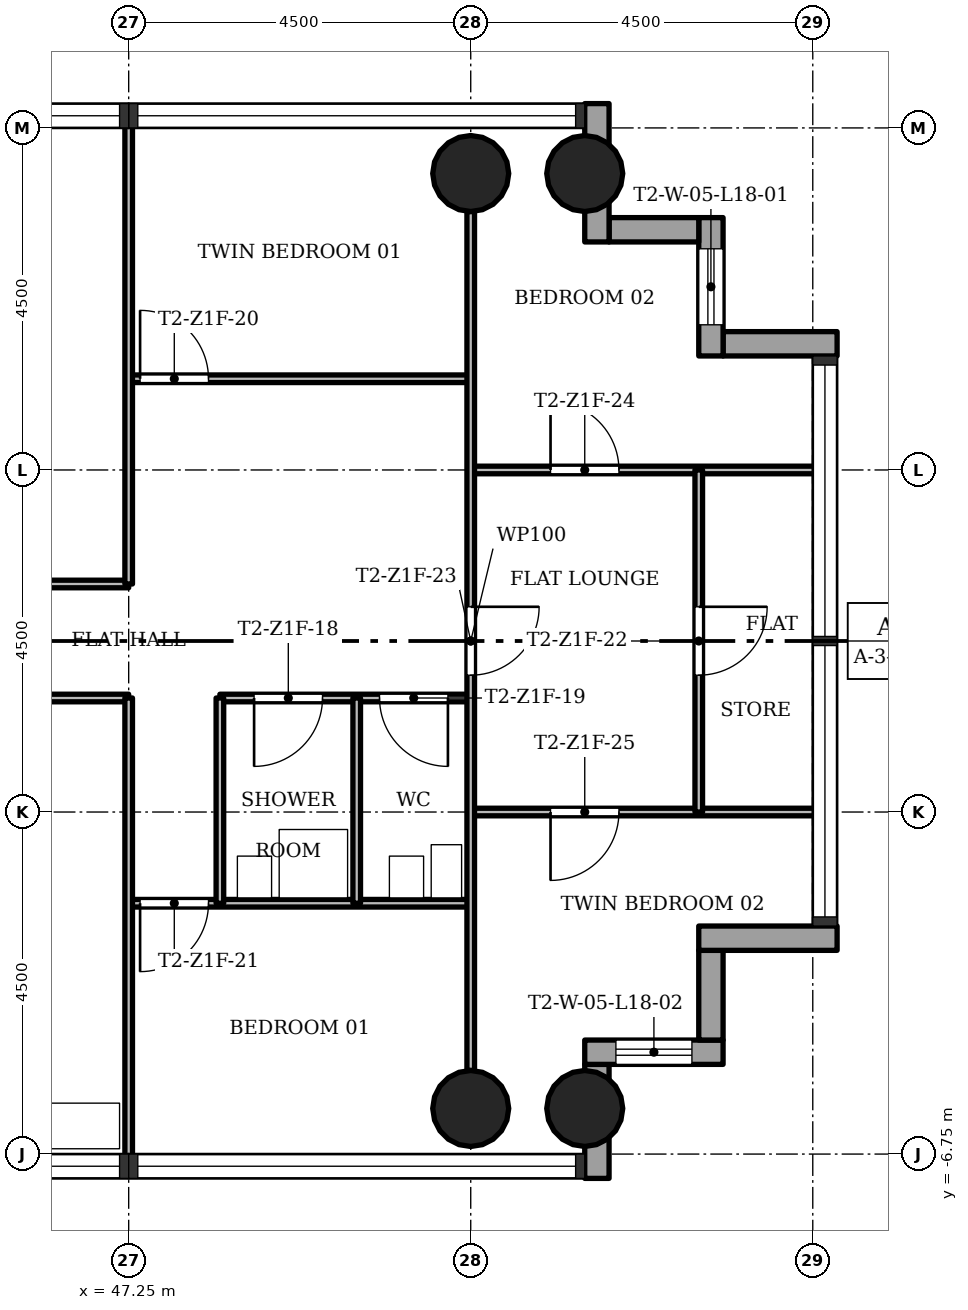
"""IFC4 building model, lengths in metres.
Left out: names, types, materials, properties, quantities, classifications, styles, units other than length and angle.
Written with IfcOpenShell. Run it as: python <this file> out.ifc"""

import sys

from ifc_helpers import new_model, si_unit, direction, frame, frame_2d, origin, origin_2d, place, context, subcontext, project, spatial, rectangle, hollow_circle, extrude, element, fill, save


model = new_model("IFC4")
c1 = context("Model", 3, precision=1e-05, world=origin(), true_north=direction((0.0, 1.0)))
c2 = subcontext(c1, "Body", "Model", "MODEL_VIEW")
j1 = project(units=[si_unit("LENGTHUNIT", "METRE"), si_unit("PLANEANGLEUNIT", "RADIAN")], contexts=[c1])
p1 = place(None, origin())
s1 = spatial("IfcSite", under=j1, at=p1, CompositionType="ELEMENT")
p2 = place(p1, origin())
s2 = spatial("IfcBuilding", under=s1, at=p2, CompositionType="ELEMENT")
p3 = place(p2, frame((0.0, 0.0, 68.7)))
s3 = spatial("IfcBuildingStorey", under=s2, at=p3, CompositionType="ELEMENT", Elevation=68.7)
for number, where, z_axis, x_axis in (
    (1, (51.75, -6.15, 0.0), (0.0, 0.0, 1.0), (1.0, 0.0, 0.0)),
    (2, (51.75, 6.15, 0.0), (0.0, 0.0, 1.0), (1.0, 0.0, 0.0)),
    (3, (53.25, -6.15, 0.0), (0.0, 0.0, 1.0), (1.0, 0.0, 0.0)),
    (4, (53.25, 6.15, 0.0), (0.0, 0.0, 1.0), (1.0, 0.0, 0.0)),
):
    element("IfcColumn", number, at=place(p3, frame(where, z_axis=z_axis, x_axis=x_axis)), inside=s3, PredefinedType="COLUMN", context=c2, shape_type="SweptSolid", body=[
        extrude(hollow_circle(Radius=0.5, WallThickness=0.036, at=origin_2d()), origin(), (0.0, 0.0, 1.0), 3.4),
    ])
p4 = place(p3, frame((53.41, -7.07, -0.3), z_axis=(0.0, 0.0, 1.0), x_axis=(0.0, 1.0, 0.0)))
e5 = element("IfcWall", 5, at=p4, inside=s3, PredefinedType="STANDARD", context=c2, shape_type="SweptSolid", body=[
    extrude(rectangle(XDim=1.5, YDim=0.32, at=frame_2d((0.75, 0.0))), origin(), (0.0, 0.0, 1.0), 3.4),
])
p5 = place(p3, frame((53.25, -5.41, -0.3), z_axis=(0.0, 0.0, 1.0), x_axis=(1.0, 0.0, 0.0)))
e6 = element("IfcWall", 6, at=p5, inside=s3, PredefinedType="STANDARD", context=c2, shape_type="SweptSolid", body=[
    extrude(rectangle(XDim=1.82, YDim=0.32, at=frame_2d((0.91, 0.0))), origin(), (0.0, 0.0, 1.0), 3.4),
])
p6 = place(p5, frame((0.41, 0.0, 1.2)))
e7 = element("IfcOpeningElement", 7, at=p6, cuts=e6, PredefinedType="OPENING", context=c2, shape_type="SweptSolid", body=[
    extrude(rectangle(XDim=1.0, YDim=1.5, at=frame_2d((0.5, 0.75))), frame((0.0, 0.17, 0.0), z_axis=(0.0, -1.0, 0.0), x_axis=(1.0, 0.0, 0.0)), (0.0, 0.0, 1.0), 0.34),
])
p7 = place(p3, frame((54.91, -5.25, -0.3), z_axis=(0.0, 0.0, 1.0), x_axis=(0.0, 1.0, 0.0)))
e8 = element("IfcWall", 8, at=p7, inside=s3, PredefinedType="STANDARD", context=c2, shape_type="SweptSolid", body=[
    extrude(rectangle(XDim=1.18, YDim=0.32, at=frame_2d((0.59, 0.0))), origin(), (0.0, 0.0, 1.0), 3.4),
])
p8 = place(p3, frame((54.75, -3.91, -0.3), z_axis=(0.0, 0.0, 1.0), x_axis=(1.0, 0.0, 0.0)))
e9 = element("IfcWall", 9, at=p8, inside=s3, PredefinedType="STANDARD", context=c2, shape_type="SweptSolid", body=[
    extrude(rectangle(XDim=1.82, YDim=0.32, at=frame_2d((0.91, 0.0))), origin(), (0.0, 0.0, 1.0), 3.4),
])
p9 = place(p3, frame((56.57, 3.91, -0.3), z_axis=(0.0, 0.0, 1.0), x_axis=(-1.0, 0.0, 0.0)))
e10 = element("IfcWall", 10, at=p9, inside=s3, PredefinedType="STANDARD", context=c2, shape_type="SweptSolid", body=[
    extrude(rectangle(XDim=1.5, YDim=0.32, at=frame_2d((0.75, 0.0))), origin(), (0.0, 0.0, 1.0), 3.4),
])
p10 = place(p3, frame((54.91, 3.75, -0.3), z_axis=(0.0, 0.0, 1.0), x_axis=(0.0, 1.0, 0.0)))
e11 = element("IfcWall", 11, at=p10, inside=s3, PredefinedType="STANDARD", context=c2, shape_type="SweptSolid", body=[
    extrude(rectangle(XDim=1.82, YDim=0.32, at=frame_2d((0.91, 0.0))), origin(), (0.0, 0.0, 1.0), 3.4),
])
p11 = place(p10, frame((0.41, 0.0, 1.2)))
e12 = element("IfcOpeningElement", 12, at=p11, cuts=e11, PredefinedType="OPENING", context=c2, shape_type="SweptSolid", body=[
    extrude(rectangle(XDim=1.0, YDim=1.5, at=frame_2d((0.5, 0.75))), frame((0.0, 0.17, 0.0), z_axis=(0.0, -1.0, 0.0), x_axis=(1.0, 0.0, 0.0)), (0.0, 0.0, 1.0), 0.34),
])
p12 = place(p3, frame((54.75, 5.41, -0.3), z_axis=(0.0, 0.0, 1.0), x_axis=(-1.0, 0.0, 0.0)))
e13 = element("IfcWall", 13, at=p12, inside=s3, PredefinedType="STANDARD", context=c2, shape_type="SweptSolid", body=[
    extrude(rectangle(XDim=1.18, YDim=0.32, at=frame_2d((0.59, 0.0))), origin(), (0.0, 0.0, 1.0), 3.4),
])
p13 = place(p3, frame((53.41, 5.25, -0.3), z_axis=(0.0, 0.0, 1.0), x_axis=(0.0, 1.0, 0.0)))
e14 = element("IfcWall", 14, at=p13, inside=s3, PredefinedType="STANDARD", context=c2, shape_type="SweptSolid", body=[
    extrude(rectangle(XDim=1.82, YDim=0.32, at=frame_2d((0.91, 0.0))), origin(), (0.0, 0.0, 1.0), 3.4),
])
p14 = place(p3, frame((51.75, -3.45, 0.0), z_axis=(0.0, 0.0, 1.0), x_axis=(-1.0, 0.0, 0.0)))
e15 = element("IfcWall", 15, at=p14, inside=s3, PredefinedType="PARTITIONING", context=c2, shape_type="SweptSolid", body=[
    extrude(rectangle(XDim=4.5, YDim=0.1, at=frame_2d((2.25, 0.0))), origin(), (0.0, 0.0, 1.0), 3.0),
])
p15 = place(p14, frame((3.45, 0.0, 0.0)))
e16 = element("IfcOpeningElement", 16, at=p15, cuts=e15, PredefinedType="OPENING", context=c2, shape_type="SweptSolid", body=[
    extrude(rectangle(XDim=0.9, YDim=2.1, at=frame_2d((0.45, 1.05))), frame((0.0, 0.06, 0.0), z_axis=(0.0, -1.0, 0.0), x_axis=(1.0, 0.0, 0.0)), (0.0, 0.0, 1.0), 0.12),
])
p16 = place(p3, frame((56.35, -2.25, 0.0), z_axis=(0.0, 0.0, 1.0), x_axis=(-1.0, 0.0, 0.0)))
e17 = element("IfcWall", 17, at=p16, inside=s3, PredefinedType="PARTITIONING", context=c2, shape_type="SweptSolid", body=[
    extrude(rectangle(XDim=4.6, YDim=0.1, at=frame_2d((2.3, 0.0))), origin(), (0.0, 0.0, 1.0), 3.0),
])
p17 = place(p16, frame((2.65, 0.0, 0.0)))
e18 = element("IfcOpeningElement", 18, at=p17, cuts=e17, PredefinedType="OPENING", context=c2, shape_type="SweptSolid", body=[
    extrude(rectangle(XDim=0.9, YDim=2.1, at=frame_2d((0.45, 1.05))), frame((0.0, 0.06, 0.0), z_axis=(0.0, -1.0, 0.0), x_axis=(1.0, 0.0, 0.0)), (0.0, 0.0, 1.0), 0.12),
])
p18 = place(p3, frame((51.75, -0.75, 0.0), z_axis=(0.0, 0.0, 1.0), x_axis=(-1.0, 0.0, 0.0)))
e19 = element("IfcWall", 19, at=p18, inside=s3, PredefinedType="PARTITIONING", context=c2, shape_type="SweptSolid", body=[
    extrude(rectangle(XDim=3.3, YDim=0.1, at=frame_2d((1.65, 0.0))), origin(), (0.0, 0.0, 1.0), 3.0),
])
p19 = place(p18, frame((1.95, 0.0, 0.0)))
e20 = element("IfcOpeningElement", 20, at=p19, cuts=e19, PredefinedType="OPENING", context=c2, shape_type="SweptSolid", body=[
    extrude(rectangle(XDim=0.9, YDim=2.1, at=frame_2d((0.45, 1.05))), frame((0.0, 0.06, 0.0), z_axis=(0.0, -1.0, 0.0), x_axis=(1.0, 0.0, 0.0)), (0.0, 0.0, 1.0), 0.12),
])
p20 = place(p18, frame((0.3, 0.0, 0.0)))
e21 = element("IfcOpeningElement", 21, at=p20, cuts=e19, PredefinedType="OPENING", context=c2, shape_type="SweptSolid", body=[
    extrude(rectangle(XDim=0.9, YDim=2.1, at=frame_2d((0.45, 1.05))), frame((0.0, 0.06, 0.0), z_axis=(0.0, -1.0, 0.0), x_axis=(1.0, 0.0, 0.0)), (0.0, 0.0, 1.0), 0.12),
])
p21 = place(p3, frame((47.25, -0.75, 0.0), z_axis=(0.0, 0.0, 1.0), x_axis=(-1.0, 0.0, 0.0)))
e22 = element("IfcWall", 22, at=p21, inside=s3, PredefinedType="PARTITIONING", context=c2, shape_type="SweptSolid", body=[
    extrude(rectangle(XDim=4.5, YDim=0.1, at=frame_2d((2.25, 0.0))), origin(), (0.0, 0.0, 1.0), 3.0),
])
p22 = place(p21, frame((1.8, 0.0, 0.0)))
e23 = element("IfcOpeningElement", 23, at=p22, cuts=e22, PredefinedType="OPENING", context=c2, shape_type="SweptSolid", body=[
    extrude(rectangle(XDim=0.9, YDim=2.1, at=frame_2d((0.45, 1.05))), frame((0.0, 0.06, 0.0), z_axis=(0.0, -1.0, 0.0), x_axis=(1.0, 0.0, 0.0)), (0.0, 0.0, 1.0), 0.12),
])
p23 = place(p3, frame((47.25, 0.75, 0.0), z_axis=(0.0, 0.0, 1.0), x_axis=(-1.0, 0.0, 0.0)))
e24 = element("IfcWall", 24, at=p23, inside=s3, PredefinedType="PARTITIONING", context=c2, shape_type="SweptSolid", body=[
    extrude(rectangle(XDim=4.5, YDim=0.1, at=frame_2d((2.25, 0.0))), origin(), (0.0, 0.0, 1.0), 3.0),
])
p24 = place(p23, frame((1.8, 0.0, 0.0)))
e25 = element("IfcOpeningElement", 25, at=p24, cuts=e24, PredefinedType="OPENING", context=c2, shape_type="SweptSolid", body=[
    extrude(rectangle(XDim=0.9, YDim=2.1, at=frame_2d((0.45, 1.05))), frame((0.0, 0.06, 0.0), z_axis=(0.0, -1.0, 0.0), x_axis=(1.0, 0.0, 0.0)), (0.0, 0.0, 1.0), 0.12),
])
p25 = place(p3, frame((56.35, 2.25, 0.0), z_axis=(0.0, 0.0, 1.0), x_axis=(-1.0, 0.0, 0.0)))
e26 = element("IfcWall", 26, at=p25, inside=s3, PredefinedType="PARTITIONING", context=c2, shape_type="SweptSolid", body=[
    extrude(rectangle(XDim=4.6, YDim=0.1, at=frame_2d((2.3, 0.0))), origin(), (0.0, 0.0, 1.0), 3.0),
])
p26 = place(p25, frame((2.65, 0.0, 0.0)))
e27 = element("IfcOpeningElement", 27, at=p26, cuts=e26, PredefinedType="OPENING", context=c2, shape_type="SweptSolid", body=[
    extrude(rectangle(XDim=0.9, YDim=2.1, at=frame_2d((0.45, 1.05))), frame((0.0, 0.06, 0.0), z_axis=(0.0, -1.0, 0.0), x_axis=(1.0, 0.0, 0.0)), (0.0, 0.0, 1.0), 0.12),
])
p27 = place(p3, frame((51.75, 3.45, 0.0), z_axis=(0.0, 0.0, 1.0), x_axis=(-1.0, 0.0, 0.0)))
e28 = element("IfcWall", 28, at=p27, inside=s3, PredefinedType="PARTITIONING", context=c2, shape_type="SweptSolid", body=[
    extrude(rectangle(XDim=4.5, YDim=0.1, at=frame_2d((2.25, 0.0))), origin(), (0.0, 0.0, 1.0), 3.0),
])
p28 = place(p27, frame((3.45, 0.0, 0.0)))
e29 = element("IfcOpeningElement", 29, at=p28, cuts=e28, PredefinedType="OPENING", context=c2, shape_type="SweptSolid", body=[
    extrude(rectangle(XDim=0.9, YDim=2.1, at=frame_2d((0.45, 1.05))), frame((0.0, 0.06, 0.0), z_axis=(0.0, -1.0, 0.0), x_axis=(1.0, 0.0, 0.0)), (0.0, 0.0, 1.0), 0.12),
])
p29 = place(p3, frame((54.75, -2.25, 0.0), z_axis=(0.0, 0.0, 1.0), x_axis=(0.0, 1.0, 0.0)))
e30 = element("IfcWall", 30, at=p29, inside=s3, PredefinedType="PARTITIONING", context=c2, shape_type="SweptSolid", body=[
    extrude(rectangle(XDim=4.5, YDim=0.1, at=frame_2d((2.25, 0.0))), origin(), (0.0, 0.0, 1.0), 3.0),
])
p30 = place(p29, frame((1.8, 0.0, 0.0)))
e31 = element("IfcOpeningElement", 31, at=p30, cuts=e30, PredefinedType="OPENING", context=c2, shape_type="SweptSolid", body=[
    extrude(rectangle(XDim=0.9, YDim=2.1, at=frame_2d((0.45, 1.05))), frame((0.0, 0.06, 0.0), z_axis=(0.0, -1.0, 0.0), x_axis=(1.0, 0.0, 0.0)), (0.0, 0.0, 1.0), 0.12),
])
p31 = place(p3, frame((51.75, -5.65, 0.0), z_axis=(0.0, 0.0, 1.0), x_axis=(0.0, 1.0, 0.0)))
e32 = element("IfcWall", 32, at=p31, inside=s3, PredefinedType="PARTITIONING", context=c2, shape_type="SweptSolid", body=[
    extrude(rectangle(XDim=11.3, YDim=0.1, at=frame_2d((5.65, 0.0))), origin(), (0.0, 0.0, 1.0), 3.0),
])
p32 = place(p31, frame((5.2, 0.0, 0.0)))
e33 = element("IfcOpeningElement", 33, at=p32, cuts=e32, PredefinedType="OPENING", context=c2, shape_type="SweptSolid", body=[
    extrude(rectangle(XDim=0.9, YDim=2.1, at=frame_2d((0.45, 1.05))), frame((0.0, 0.06, 0.0), z_axis=(0.0, -1.0, 0.0), x_axis=(1.0, 0.0, 0.0)), (0.0, 0.0, 1.0), 0.12),
])
for number, where, z_axis, x_axis in (
    (34, (50.25, -3.45, 0.0), (0.0, 0.0, 1.0), (0.0, 1.0, 0.0)),
    (35, (48.45, -3.45, 0.0), (0.0, 0.0, 1.0), (0.0, 1.0, 0.0)),
):
    element("IfcWall", number, at=place(p3, frame(where, z_axis=z_axis, x_axis=x_axis)), inside=s3, PredefinedType="PARTITIONING", context=c2, shape_type="SweptSolid", body=[
        extrude(rectangle(XDim=2.7, YDim=0.1, at=frame_2d((1.35, 0.0))), origin(), (0.0, 0.0, 1.0), 3.0),
    ])
for number, where, z_axis, x_axis in (
    (36, (47.25, -6.85, 0.0), (0.0, 0.0, 1.0), (0.0, 1.0, 0.0)),
    (37, (47.25, 0.75, 0.0), (0.0, 0.0, 1.0), (0.0, 1.0, 0.0)),
):
    element("IfcWall", number, at=place(p3, frame(where, z_axis=z_axis, x_axis=x_axis)), inside=s3, PredefinedType="PARTITIONING", context=c2, shape_type="SweptSolid", body=[
        extrude(rectangle(XDim=6.1, YDim=0.1, at=frame_2d((3.05, 0.0))), origin(), (0.0, 0.0, 1.0), 3.0),
    ])
p33 = place(p19, origin())
e38 = element("IfcDoor", 38, at=p33, inside=s3, OperationType="SINGLE_SWING_LEFT", PredefinedType="DOOR", context=c2, shape_type="SweptSolid", body=[
    extrude(rectangle(XDim=0.9, YDim=2.1, at=frame_2d((0.45, 1.05))), frame((0.0, 0.025, 0.0), z_axis=(0.0, -1.0, 0.0), x_axis=(1.0, 0.0, 0.0)), (0.0, 0.0, 1.0), 0.05),
])
fill(e20, e38)
p34 = place(p20, origin())
e39 = element("IfcDoor", 39, at=p34, inside=s3, OperationType="SINGLE_SWING_RIGHT", PredefinedType="DOOR", context=c2, shape_type="SweptSolid", body=[
    extrude(rectangle(XDim=0.9, YDim=2.1, at=frame_2d((0.45, 1.05))), frame((0.0, 0.025, 0.0), z_axis=(0.0, -1.0, 0.0), x_axis=(1.0, 0.0, 0.0)), (0.0, 0.0, 1.0), 0.05),
])
fill(e21, e39)
p35 = place(p28, origin())
e40 = element("IfcDoor", 40, at=p35, inside=s3, OperationType="SINGLE_SWING_RIGHT", PredefinedType="DOOR", context=c2, shape_type="SweptSolid", body=[
    extrude(rectangle(XDim=0.9, YDim=2.1, at=frame_2d((0.45, 1.05))), frame((0.0, 0.025, 0.0), z_axis=(0.0, -1.0, 0.0), x_axis=(1.0, 0.0, 0.0)), (0.0, 0.0, 1.0), 0.05),
])
fill(e29, e40)
p36 = place(p15, origin())
e41 = element("IfcDoor", 41, at=p36, inside=s3, OperationType="SINGLE_SWING_LEFT", PredefinedType="DOOR", context=c2, shape_type="SweptSolid", body=[
    extrude(rectangle(XDim=0.9, YDim=2.1, at=frame_2d((0.45, 1.05))), frame((0.0, 0.025, 0.0), z_axis=(0.0, -1.0, 0.0), x_axis=(1.0, 0.0, 0.0)), (0.0, 0.0, 1.0), 0.05),
])
fill(e16, e41)
p37 = place(p30, origin())
e42 = element("IfcDoor", 42, at=p37, inside=s3, OperationType="SINGLE_SWING_RIGHT", PredefinedType="DOOR", context=c2, shape_type="SweptSolid", body=[
    extrude(rectangle(XDim=0.9, YDim=2.1, at=frame_2d((0.45, 1.05))), frame((0.0, 0.025, 0.0), z_axis=(0.0, -1.0, 0.0), x_axis=(1.0, 0.0, 0.0)), (0.0, 0.0, 1.0), 0.05),
])
fill(e31, e42)
p38 = place(p32, origin())
e43 = element("IfcDoor", 43, at=p38, inside=s3, OperationType="SINGLE_SWING_RIGHT", PredefinedType="DOOR", context=c2, shape_type="SweptSolid", body=[
    extrude(rectangle(XDim=0.9, YDim=2.1, at=frame_2d((0.45, 1.05))), frame((0.0, 0.025, 0.0), z_axis=(0.0, -1.0, 0.0), x_axis=(1.0, 0.0, 0.0)), (0.0, 0.0, 1.0), 0.05),
])
fill(e33, e43)
p39 = place(p26, origin())
e44 = element("IfcDoor", 44, at=p39, inside=s3, OperationType="SINGLE_SWING_RIGHT", PredefinedType="DOOR", context=c2, shape_type="SweptSolid", body=[
    extrude(rectangle(XDim=0.9, YDim=2.1, at=frame_2d((0.45, 1.05))), frame((0.0, 0.025, 0.0), z_axis=(0.0, -1.0, 0.0), x_axis=(1.0, 0.0, 0.0)), (0.0, 0.0, 1.0), 0.05),
])
fill(e27, e44)
p40 = place(p17, origin())
e45 = element("IfcDoor", 45, at=p40, inside=s3, OperationType="SINGLE_SWING_LEFT", PredefinedType="DOOR", context=c2, shape_type="SweptSolid", body=[
    extrude(rectangle(XDim=0.9, YDim=2.1, at=frame_2d((0.45, 1.05))), frame((0.0, 0.025, 0.0), z_axis=(0.0, -1.0, 0.0), x_axis=(1.0, 0.0, 0.0)), (0.0, 0.0, 1.0), 0.05),
])
fill(e18, e45)
p41 = place(p11, origin())
e46 = element("IfcWindow", 46, at=p41, inside=s3, PartitioningType="SINGLE_PANEL", PredefinedType="WINDOW", context=c2, shape_type="SweptSolid", body=[
    extrude(rectangle(XDim=1.0, YDim=1.5, at=frame_2d((0.5, 0.75))), frame((0.0, 0.03, 0.0), z_axis=(0.0, -1.0, 0.0), x_axis=(1.0, 0.0, 0.0)), (0.0, 0.0, 1.0), 0.06),
])
fill(e12, e46)
p42 = place(p6, origin())
e47 = element("IfcWindow", 47, at=p42, inside=s3, PartitioningType="SINGLE_PANEL", PredefinedType="WINDOW", context=c2, shape_type="SweptSolid", body=[
    extrude(rectangle(XDim=1.0, YDim=1.5, at=frame_2d((0.5, 0.75))), frame((0.0, 0.03, 0.0), z_axis=(0.0, -1.0, 0.0), x_axis=(1.0, 0.0, 0.0)), (0.0, 0.0, 1.0), 0.06),
])
fill(e7, e47)
save(model, sys.argv[1])
